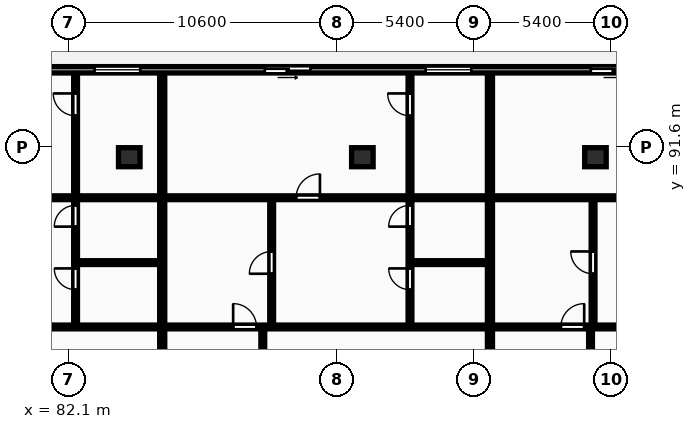
"""IFC4 building model, lengths in metres.
Left out: names, types, materials, properties, quantities, classifications, styles, units other than length and angle.
Written with IfcOpenShell. Run it as: python <this file> out.ifc"""

import sys

from ifc_helpers import new_model, si_unit, direction, frame, frame_2d, origin, origin_2d, place, context, subcontext, project, spatial, rectangle, extrude, element, fill, save


model = new_model("IFC4")
c1 = context("Model", 3, precision=1e-05, world=origin(), true_north=direction((0.0, 1.0)))
c2 = subcontext(c1, "Body", "Model", "MODEL_VIEW")
j1 = project(units=[si_unit("LENGTHUNIT", "METRE"), si_unit("PLANEANGLEUNIT", "RADIAN")], contexts=[c1])
p1 = place(None, origin())
s1 = spatial("IfcSite", under=j1, at=p1, CompositionType="ELEMENT")
p2 = place(p1, origin())
s2 = spatial("IfcBuilding", under=s1, at=p2, CompositionType="ELEMENT")
p3 = place(p2, frame((0.0, 0.0, 210.85)))
s3 = spatial("IfcBuildingStorey", under=s2, at=p3, CompositionType="ELEMENT", Elevation=210.85)
for number, where, z_axis, x_axis in (
    (1, (84.5, 91.2, 0.0), (0.0, 0.0, 1.0), (1.0, 0.0, 0.0)),
    (2, (93.7, 91.2, 0.0), (0.0, 0.0, 1.0), (1.0, 0.0, 0.0)),
    (3, (102.9, 91.2, 0.0), (0.0, 0.0, 1.0), (1.0, 0.0, 0.0)),
):
    element("IfcColumn", number, at=place(p3, frame(where, z_axis=z_axis, x_axis=x_axis)), inside=s3, PredefinedType="COLUMN", context=c2, shape_type="SweptSolid", body=[
        extrude(rectangle(XDim=0.85, YDim=0.75, at=origin_2d()), origin(), (0.0, 0.0, 1.0), 3.25),
    ])
p4 = place(p3, frame((128.4, 94.65, 0.0), z_axis=(0.0, 0.0, 1.0), x_axis=(-1.0, 0.0, 0.0)))
e4 = element("IfcWall", 4, at=p4, inside=s3, PredefinedType="STANDARD", context=c2, shape_type="SweptSolid", body=[
    extrude(rectangle(XDim=68.6, YDim=0.25, at=frame_2d((34.3, 0.0))), origin(), (0.0, 0.0, 1.0), 2.97),
])
p5 = place(p4, frame((62.6, 0.0, 0.0)))
e5 = element("IfcOpeningElement", 5, at=p5, cuts=e4, PredefinedType="OPENING", context=c2, shape_type="SweptSolid", body=[
    extrude(rectangle(XDim=1.8, YDim=2.2, at=frame_2d((0.9, 1.1))), frame((0.0, 0.135, 0.0), z_axis=(0.0, -1.0, 0.0), x_axis=(1.0, 0.0, 0.0)), (0.0, 0.0, 1.0), 0.27),
])
p6 = place(p4, frame((56.252, 0.0, 0.85)))
e6 = element("IfcOpeningElement", 6, at=p6, cuts=e4, PredefinedType="OPENING", context=c2, shape_type="SweptSolid", body=[
    extrude(rectangle(XDim=1.8, YDim=1.8, at=frame_2d((0.9, 0.9))), frame((0.0, 0.135, 0.0), z_axis=(0.0, -1.0, 0.0), x_axis=(1.0, 0.0, 0.0)), (0.0, 0.0, 1.0), 0.27),
])
p7 = place(p4, frame((49.882, 0.0, 0.0)))
e7 = element("IfcOpeningElement", 7, at=p7, cuts=e4, PredefinedType="OPENING", context=c2, shape_type="SweptSolid", body=[
    extrude(rectangle(XDim=1.8, YDim=2.2, at=frame_2d((0.9, 1.1))), frame((0.0, 0.135, 0.0), z_axis=(0.0, -1.0, 0.0), x_axis=(1.0, 0.0, 0.0)), (0.0, 0.0, 1.0), 0.27),
])
p8 = place(p4, frame((43.47, 0.0, 0.85)))
e8 = element("IfcOpeningElement", 8, at=p8, cuts=e4, PredefinedType="OPENING", context=c2, shape_type="SweptSolid", body=[
    extrude(rectangle(XDim=1.8, YDim=1.8, at=frame_2d((0.9, 0.9))), frame((0.0, 0.135, 0.0), z_axis=(0.0, -1.0, 0.0), x_axis=(1.0, 0.0, 0.0)), (0.0, 0.0, 1.0), 0.27),
])
p9 = place(p4, frame((36.75, 0.0, 0.0)))
e9 = element("IfcOpeningElement", 9, at=p9, cuts=e4, PredefinedType="OPENING", context=c2, shape_type="SweptSolid", body=[
    extrude(rectangle(XDim=1.8, YDim=2.2, at=frame_2d((0.9, 1.1))), frame((0.0, 0.135, 0.0), z_axis=(0.0, -1.0, 0.0), x_axis=(1.0, 0.0, 0.0)), (0.0, 0.0, 1.0), 0.27),
])
p10 = place(p4, frame((30.402, 0.0, 0.85)))
e10 = element("IfcOpeningElement", 10, at=p10, cuts=e4, PredefinedType="OPENING", context=c2, shape_type="SweptSolid", body=[
    extrude(rectangle(XDim=1.8, YDim=1.8, at=frame_2d((0.9, 0.9))), frame((0.0, 0.135, 0.0), z_axis=(0.0, -1.0, 0.0), x_axis=(1.0, 0.0, 0.0)), (0.0, 0.0, 1.0), 0.27),
])
p11 = place(p4, frame((23.882, 0.0, 0.0)))
e11 = element("IfcOpeningElement", 11, at=p11, cuts=e4, PredefinedType="OPENING", context=c2, shape_type="SweptSolid", body=[
    extrude(rectangle(XDim=1.8, YDim=2.2, at=frame_2d((0.9, 1.1))), frame((0.0, 0.135, 0.0), z_axis=(0.0, -1.0, 0.0), x_axis=(1.0, 0.0, 0.0)), (0.0, 0.0, 1.0), 0.27),
])
p12 = place(p4, frame((17.47, 0.0, 0.85)))
e12 = element("IfcOpeningElement", 12, at=p12, cuts=e4, PredefinedType="OPENING", context=c2, shape_type="SweptSolid", body=[
    extrude(rectangle(XDim=1.8, YDim=1.8, at=frame_2d((0.9, 0.9))), frame((0.0, 0.135, 0.0), z_axis=(0.0, -1.0, 0.0), x_axis=(1.0, 0.0, 0.0)), (0.0, 0.0, 1.0), 0.27),
])
p13 = place(p4, frame((9.415, 0.0, 0.85)))
e13 = element("IfcOpeningElement", 13, at=p13, cuts=e4, PredefinedType="OPENING", context=c2, shape_type="SweptSolid", body=[
    extrude(rectangle(XDim=1.8, YDim=1.8, at=frame_2d((0.9, 0.9))), frame((0.0, 0.135, 0.0), z_axis=(0.0, -1.0, 0.0), x_axis=(1.0, 0.0, 0.0)), (0.0, 0.0, 1.0), 0.27),
])
p14 = place(p4, frame((5.756, 0.0, 0.85)))
e14 = element("IfcOpeningElement", 14, at=p14, cuts=e4, PredefinedType="OPENING", context=c2, shape_type="SweptSolid", body=[
    extrude(rectangle(XDim=1.8, YDim=1.8, at=frame_2d((0.9, 0.9))), frame((0.0, 0.135, 0.0), z_axis=(0.0, -1.0, 0.0), x_axis=(1.0, 0.0, 0.0)), (0.0, 0.0, 1.0), 0.27),
])
p15 = place(p4, frame((13.35, 0.0, 0.0)))
e15 = element("IfcOpeningElement", 15, at=p15, cuts=e4, PredefinedType="OPENING", context=c2, shape_type="SweptSolid", body=[
    extrude(rectangle(XDim=1.8, YDim=2.2, at=frame_2d((0.9, 1.1))), frame((0.0, 0.135, 0.0), z_axis=(0.0, -1.0, 0.0), x_axis=(1.0, 0.0, 0.0)), (0.0, 0.0, 1.0), 0.27),
])
p16 = place(p4, frame((1.21, 0.0, 0.85)))
e16 = element("IfcOpeningElement", 16, at=p16, cuts=e4, PredefinedType="OPENING", context=c2, shape_type="SweptSolid", body=[
    extrude(rectangle(XDim=2.4, YDim=1.9, at=frame_2d((1.2, 0.95))), frame((0.0, 0.135, 0.0), z_axis=(0.0, -1.0, 0.0), x_axis=(1.0, 0.0, 0.0)), (0.0, 0.0, 1.0), 0.27),
])
p17 = place(p3, frame((85.8, 70.18, 0.0), z_axis=(0.0, 0.0, 1.0), x_axis=(0.0, 1.0, 0.0)))
e17 = element("IfcWall", 17, at=p17, inside=s3, PredefinedType="PARTITIONING", context=c2, shape_type="SweptSolid", body=[
    extrude(rectangle(XDim=24.32, YDim=0.2, at=frame_2d((12.16, 0.0))), origin(), (0.0, 0.0, 1.0), 2.97),
])
p18 = place(p3, frame((82.44, 87.04, 0.0), z_axis=(0.0, 0.0, 1.0), x_axis=(1.0, 0.0, 0.0)))
e18 = element("IfcWall", 18, at=p18, inside=s3, PredefinedType="PARTITIONING", context=c2, shape_type="SweptSolid", body=[
    extrude(rectangle(XDim=3.28, YDim=0.15, at=frame_2d((1.64, 0.0))), origin(), (0.0, 0.0, 1.0), 2.97),
])
p19 = place(p3, frame((82.38, 84.54, 0.0), z_axis=(0.0, 0.0, 1.0), x_axis=(0.0, 1.0, 0.0)))
e19 = element("IfcWall", 19, at=p19, inside=s3, PredefinedType="PARTITIONING", context=c2, shape_type="SweptSolid", body=[
    extrude(rectangle(XDim=9.96, YDim=0.15, at=frame_2d((4.98, 0.0))), origin(), (0.0, 0.0, 1.0), 2.97),
])
p20 = place(p19, frame((1.43, 0.0, 0.0)))
e20 = element("IfcOpeningElement", 20, at=p20, cuts=e19, PredefinedType="OPENING", context=c2, shape_type="SweptSolid", body=[
    extrude(rectangle(XDim=0.84, YDim=2.04, at=frame_2d((0.42, 1.02))), frame((0.0, 0.085, 0.0), z_axis=(0.0, -1.0, 0.0), x_axis=(1.0, 0.0, 0.0)), (0.0, 0.0, 1.0), 0.17),
])
p21 = place(p19, frame((3.92, 0.0, 0.0)))
e21 = element("IfcOpeningElement", 21, at=p21, cuts=e19, PredefinedType="OPENING", context=c2, shape_type="SweptSolid", body=[
    extrude(rectangle(XDim=0.84, YDim=2.04, at=frame_2d((0.42, 1.02))), frame((0.0, 0.085, 0.0), z_axis=(0.0, -1.0, 0.0), x_axis=(1.0, 0.0, 0.0)), (0.0, 0.0, 1.0), 0.17),
])
p22 = place(p19, frame((8.297, 0.0, 0.0)))
e22 = element("IfcOpeningElement", 22, at=p22, cuts=e19, PredefinedType="OPENING", context=c2, shape_type="SweptSolid", body=[
    extrude(rectangle(XDim=0.88, YDim=2.06, at=frame_2d((0.44, 1.03))), frame((0.0, 0.085, 0.0), z_axis=(0.0, -1.0, 0.0), x_axis=(1.0, 0.0, 0.0)), (0.0, 0.0, 1.0), 0.17),
])
p23 = place(p3, frame((72.816, 84.5, 0.0), z_axis=(0.0, 0.0, 1.0), x_axis=(1.0, 0.0, 0.0)))
e23 = element("IfcWall", 23, at=p23, inside=s3, PredefinedType="PARTITIONING", context=c2, shape_type="SweptSolid", body=[
    extrude(rectangle(XDim=12.904, YDim=0.15, at=frame_2d((6.452, 0.0))), origin(), (0.0, 0.0, 1.0), 2.97),
])
p24 = place(p23, frame((2.72, 0.0, 0.0)))
e24 = element("IfcOpeningElement", 24, at=p24, cuts=e23, PredefinedType="OPENING", context=c2, shape_type="SweptSolid", body=[
    extrude(rectangle(XDim=0.92, YDim=2.08, at=frame_2d((0.46, 1.04))), frame((0.0, 0.085, 0.0), z_axis=(0.0, -1.0, 0.0), x_axis=(1.0, 0.0, 0.0)), (0.0, 0.0, 1.0), 0.17),
])
p25 = place(p3, frame((72.816, 89.6, 0.0), z_axis=(0.0, 0.0, 1.0), x_axis=(1.0, 0.0, 0.0)))
e25 = element("IfcWall", 25, at=p25, inside=s3, PredefinedType="PARTITIONING", context=c2, shape_type="SweptSolid", body=[
    extrude(rectangle(XDim=12.904, YDim=0.15, at=frame_2d((6.452, 0.0))), origin(), (0.0, 0.0, 1.0), 2.97),
])
p26 = place(p25, frame((5.982, 0.0, 0.0)))
e26 = element("IfcOpeningElement", 26, at=p26, cuts=e25, PredefinedType="OPENING", context=c2, shape_type="SweptSolid", body=[
    extrude(rectangle(XDim=0.94, YDim=2.1, at=frame_2d((0.47, 1.05))), frame((0.0, 0.085, 0.0), z_axis=(0.0, -1.0, 0.0), x_axis=(1.0, 0.0, 0.0)), (0.0, 0.0, 1.0), 0.17),
])
p27 = place(p3, frame((98.736, 70.18, 0.0), z_axis=(0.0, 0.0, 1.0), x_axis=(0.0, 1.0, 0.0)))
e27 = element("IfcWall", 27, at=p27, inside=s3, PredefinedType="PARTITIONING", context=c2, shape_type="SweptSolid", body=[
    extrude(rectangle(XDim=24.32, YDim=0.2, at=frame_2d((12.16, 0.0))), origin(), (0.0, 0.0, 1.0), 2.97),
])
p28 = place(p3, frame((89.77, 70.16, 0.0), z_axis=(0.0, 0.0, 1.0), x_axis=(0.0, 1.0, 0.0)))
e28 = element("IfcWall", 28, at=p28, inside=s3, PredefinedType="PARTITIONING", context=c2, shape_type="SweptSolid", body=[
    extrude(rectangle(XDim=14.3, YDim=0.15, at=frame_2d((7.15, 0.0))), origin(), (0.0, 0.0, 1.0), 2.97),
])
p29 = place(p28, frame((5.84, 0.0, 0.0)))
e29 = element("IfcOpeningElement", 29, at=p29, cuts=e28, PredefinedType="OPENING", context=c2, shape_type="SweptSolid", body=[
    extrude(rectangle(XDim=0.88, YDim=2.06, at=frame_2d((0.44, 1.03))), frame((0.0, 0.085, 0.0), z_axis=(0.0, -1.0, 0.0), x_axis=(1.0, 0.0, 0.0)), (0.0, 0.0, 1.0), 0.17),
])
p30 = place(p3, frame((90.12, 84.54, 0.0), z_axis=(0.0, 0.0, 1.0), x_axis=(0.0, 1.0, 0.0)))
e30 = element("IfcWall", 30, at=p30, inside=s3, PredefinedType="PARTITIONING", context=c2, shape_type="SweptSolid", body=[
    extrude(rectangle(XDim=5.0, YDim=0.15, at=frame_2d((2.5, 0.0))), origin(), (0.0, 0.0, 1.0), 2.97),
])
p31 = place(p30, frame((2.06, 0.0, 0.0)))
e31 = element("IfcOpeningElement", 31, at=p31, cuts=e30, PredefinedType="OPENING", context=c2, shape_type="SweptSolid", body=[
    extrude(rectangle(XDim=0.88, YDim=2.06, at=frame_2d((0.44, 1.03))), frame((0.0, 0.085, 0.0), z_axis=(0.0, -1.0, 0.0), x_axis=(1.0, 0.0, 0.0)), (0.0, 0.0, 1.0), 0.17),
])
p32 = place(p3, frame((95.64, 87.04, 0.0), z_axis=(0.0, 0.0, 1.0), x_axis=(1.0, 0.0, 0.0)))
e32 = element("IfcWall", 32, at=p32, inside=s3, PredefinedType="PARTITIONING", context=c2, shape_type="SweptSolid", body=[
    extrude(rectangle(XDim=3.016, YDim=0.15, at=frame_2d((1.508, 0.0))), origin(), (0.0, 0.0, 1.0), 2.97),
])
p33 = place(p3, frame((95.58, 84.54, 0.0), z_axis=(0.0, 0.0, 1.0), x_axis=(0.0, 1.0, 0.0)))
e33 = element("IfcWall", 33, at=p33, inside=s3, PredefinedType="PARTITIONING", context=c2, shape_type="SweptSolid", body=[
    extrude(rectangle(XDim=9.96, YDim=0.15, at=frame_2d((4.98, 0.0))), origin(), (0.0, 0.0, 1.0), 2.97),
])
p34 = place(p33, frame((1.43, 0.0, 0.0)))
e34 = element("IfcOpeningElement", 34, at=p34, cuts=e33, PredefinedType="OPENING", context=c2, shape_type="SweptSolid", body=[
    extrude(rectangle(XDim=0.84, YDim=2.04, at=frame_2d((0.42, 1.02))), frame((0.0, 0.085, 0.0), z_axis=(0.0, -1.0, 0.0), x_axis=(1.0, 0.0, 0.0)), (0.0, 0.0, 1.0), 0.17),
])
p35 = place(p33, frame((3.92, 0.0, 0.0)))
e35 = element("IfcOpeningElement", 35, at=p35, cuts=e33, PredefinedType="OPENING", context=c2, shape_type="SweptSolid", body=[
    extrude(rectangle(XDim=0.84, YDim=2.04, at=frame_2d((0.42, 1.02))), frame((0.0, 0.085, 0.0), z_axis=(0.0, -1.0, 0.0), x_axis=(1.0, 0.0, 0.0)), (0.0, 0.0, 1.0), 0.17),
])
p36 = place(p33, frame((8.297, 0.0, 0.0)))
e36 = element("IfcOpeningElement", 36, at=p36, cuts=e33, PredefinedType="OPENING", context=c2, shape_type="SweptSolid", body=[
    extrude(rectangle(XDim=0.88, YDim=2.06, at=frame_2d((0.44, 1.03))), frame((0.0, 0.085, 0.0), z_axis=(0.0, -1.0, 0.0), x_axis=(1.0, 0.0, 0.0)), (0.0, 0.0, 1.0), 0.17),
])
p37 = place(p3, frame((85.88, 84.5, 0.0), z_axis=(0.0, 0.0, 1.0), x_axis=(1.0, 0.0, 0.0)))
e37 = element("IfcWall", 37, at=p37, inside=s3, PredefinedType="PARTITIONING", context=c2, shape_type="SweptSolid", body=[
    extrude(rectangle(XDim=12.776, YDim=0.15, at=frame_2d((6.388, 0.0))), origin(), (0.0, 0.0, 1.0), 2.97),
])
p38 = place(p37, frame((2.72, 0.0, 0.0)))
e38 = element("IfcOpeningElement", 38, at=p38, cuts=e37, PredefinedType="OPENING", context=c2, shape_type="SweptSolid", body=[
    extrude(rectangle(XDim=0.92, YDim=2.08, at=frame_2d((0.46, 1.04))), frame((0.0, 0.085, 0.0), z_axis=(0.0, -1.0, 0.0), x_axis=(1.0, 0.0, 0.0)), (0.0, 0.0, 1.0), 0.17),
])
p39 = place(p3, frame((85.88, 89.6, 0.0), z_axis=(0.0, 0.0, 1.0), x_axis=(1.0, 0.0, 0.0)))
e39 = element("IfcWall", 39, at=p39, inside=s3, PredefinedType="PARTITIONING", context=c2, shape_type="SweptSolid", body=[
    extrude(rectangle(XDim=12.776, YDim=0.15, at=frame_2d((6.388, 0.0))), origin(), (0.0, 0.0, 1.0), 2.97),
])
p40 = place(p39, frame((5.206, 0.0, 0.0)))
e40 = element("IfcOpeningElement", 40, at=p40, cuts=e39, PredefinedType="OPENING", context=c2, shape_type="SweptSolid", body=[
    extrude(rectangle(XDim=0.94, YDim=2.1, at=frame_2d((0.47, 1.05))), frame((0.0, 0.085, 0.0), z_axis=(0.0, -1.0, 0.0), x_axis=(1.0, 0.0, 0.0)), (0.0, 0.0, 1.0), 0.17),
])
p41 = place(p3, frame((102.706, 70.16, 0.0), z_axis=(0.0, 0.0, 1.0), x_axis=(0.0, 1.0, 0.0)))
e41 = element("IfcWall", 41, at=p41, inside=s3, PredefinedType="PARTITIONING", context=c2, shape_type="SweptSolid", body=[
    extrude(rectangle(XDim=14.3, YDim=0.15, at=frame_2d((7.15, 0.0))), origin(), (0.0, 0.0, 1.0), 2.277),
])
p42 = place(p41, frame((6.02, 0.0, 0.0)))
e42 = element("IfcOpeningElement", 42, at=p42, cuts=e41, PredefinedType="OPENING", context=c2, shape_type="SweptSolid", body=[
    extrude(rectangle(XDim=0.88, YDim=2.06, at=frame_2d((0.44, 1.03))), frame((0.0, 0.085, 0.0), z_axis=(0.0, -1.0, 0.0), x_axis=(1.0, 0.0, 0.0)), (0.0, 0.0, 1.0), 0.17),
])
p43 = place(p3, frame((102.806, 84.54, 0.0), z_axis=(0.0, 0.0, 1.0), x_axis=(0.0, 1.0, 0.0)))
e43 = element("IfcWall", 43, at=p43, inside=s3, PredefinedType="PARTITIONING", context=c2, shape_type="SweptSolid", body=[
    extrude(rectangle(XDim=5.0, YDim=0.15, at=frame_2d((2.5, 0.0))), origin(), (0.0, 0.0, 1.0), 2.277),
])
p44 = place(p43, frame((2.06, 0.0, 0.0)))
e44 = element("IfcOpeningElement", 44, at=p44, cuts=e43, PredefinedType="OPENING", context=c2, shape_type="SweptSolid", body=[
    extrude(rectangle(XDim=0.88, YDim=2.06, at=frame_2d((0.44, 1.03))), frame((0.0, 0.085, 0.0), z_axis=(0.0, -1.0, 0.0), x_axis=(1.0, 0.0, 0.0)), (0.0, 0.0, 1.0), 0.17),
])
p45 = place(p3, frame((98.816, 84.5, 0.0), z_axis=(0.0, 0.0, 1.0), x_axis=(1.0, 0.0, 0.0)))
e45 = element("IfcWall", 45, at=p45, inside=s3, PredefinedType="PARTITIONING", context=c2, shape_type="SweptSolid", body=[
    extrude(rectangle(XDim=12.904, YDim=0.15, at=frame_2d((6.452, 0.0))), origin(), (0.0, 0.0, 1.0), 2.97),
])
p46 = place(p45, frame((2.72, 0.0, 0.0)))
e46 = element("IfcOpeningElement", 46, at=p46, cuts=e45, PredefinedType="OPENING", context=c2, shape_type="SweptSolid", body=[
    extrude(rectangle(XDim=0.92, YDim=2.08, at=frame_2d((0.46, 1.04))), frame((0.0, 0.085, 0.0), z_axis=(0.0, -1.0, 0.0), x_axis=(1.0, 0.0, 0.0)), (0.0, 0.0, 1.0), 0.17),
])
p47 = place(p3, frame((98.816, 89.6, 0.0), z_axis=(0.0, 0.0, 1.0), x_axis=(1.0, 0.0, 0.0)))
e47 = element("IfcWall", 47, at=p47, inside=s3, PredefinedType="PARTITIONING", context=c2, shape_type="SweptSolid", body=[
    extrude(rectangle(XDim=12.904, YDim=0.15, at=frame_2d((6.452, 0.0))), origin(), (0.0, 0.0, 1.0), 2.97),
])
p48 = place(p47, frame((5.982, 0.0, 0.0)))
e48 = element("IfcOpeningElement", 48, at=p48, cuts=e47, PredefinedType="OPENING", context=c2, shape_type="SweptSolid", body=[
    extrude(rectangle(XDim=0.94, YDim=2.1, at=frame_2d((0.47, 1.05))), frame((0.0, 0.085, 0.0), z_axis=(0.0, -1.0, 0.0), x_axis=(1.0, 0.0, 0.0)), (0.0, 0.0, 1.0), 0.17),
])
p49 = place(p8, origin())
e49 = element("IfcWindow", 49, at=p49, inside=s3, PartitioningType="SINGLE_PANEL", PredefinedType="WINDOW", context=c2, shape_type="SweptSolid", body=[
    extrude(rectangle(XDim=1.8, YDim=1.8, at=frame_2d((0.9, 0.9))), frame((0.0, 0.03, 0.0), z_axis=(0.0, -1.0, 0.0), x_axis=(1.0, 0.0, 0.0)), (0.0, 0.0, 1.0), 0.06),
])
fill(e8, e49)
p50 = place(p9, origin())
e50 = element("IfcDoor", 50, at=p50, inside=s3, OperationType="SLIDING_TO_LEFT", PredefinedType="DOOR", context=c2, shape_type="SweptSolid", body=[
    extrude(rectangle(XDim=1.8, YDim=2.2, at=frame_2d((0.9, 1.1))), frame((0.0, 0.025, 0.0), z_axis=(0.0, -1.0, 0.0), x_axis=(1.0, 0.0, 0.0)), (0.0, 0.0, 1.0), 0.05),
])
fill(e9, e50)
p51 = place(p10, origin())
e51 = element("IfcWindow", 51, at=p51, inside=s3, PartitioningType="SINGLE_PANEL", PredefinedType="WINDOW", context=c2, shape_type="SweptSolid", body=[
    extrude(rectangle(XDim=1.8, YDim=1.8, at=frame_2d((0.9, 0.9))), frame((0.0, 0.03, 0.0), z_axis=(0.0, -1.0, 0.0), x_axis=(1.0, 0.0, 0.0)), (0.0, 0.0, 1.0), 0.06),
])
fill(e10, e51)
p52 = place(p11, origin())
e52 = element("IfcDoor", 52, at=p52, inside=s3, OperationType="SLIDING_TO_LEFT", PredefinedType="DOOR", context=c2, shape_type="SweptSolid", body=[
    extrude(rectangle(XDim=1.8, YDim=2.2, at=frame_2d((0.9, 1.1))), frame((0.0, 0.025, 0.0), z_axis=(0.0, -1.0, 0.0), x_axis=(1.0, 0.0, 0.0)), (0.0, 0.0, 1.0), 0.05),
])
fill(e11, e52)
p53 = place(p20, origin())
e53 = element("IfcDoor", 53, at=p53, inside=s3, OperationType="SINGLE_SWING_RIGHT", PredefinedType="DOOR", context=c2, shape_type="SweptSolid", body=[
    extrude(rectangle(XDim=0.84, YDim=2.04, at=frame_2d((0.42, 1.02))), frame((0.0, 0.025, 0.0), z_axis=(0.0, -1.0, 0.0), x_axis=(1.0, 0.0, 0.0)), (0.0, 0.0, 1.0), 0.05),
])
fill(e20, e53)
p54 = place(p21, origin())
e54 = element("IfcDoor", 54, at=p54, inside=s3, OperationType="SINGLE_SWING_LEFT", PredefinedType="DOOR", context=c2, shape_type="SweptSolid", body=[
    extrude(rectangle(XDim=0.84, YDim=2.04, at=frame_2d((0.42, 1.02))), frame((0.0, 0.025, 0.0), z_axis=(0.0, -1.0, 0.0), x_axis=(1.0, 0.0, 0.0)), (0.0, 0.0, 1.0), 0.05),
])
fill(e21, e54)
p55 = place(p22, origin())
e55 = element("IfcDoor", 55, at=p55, inside=s3, OperationType="SINGLE_SWING_RIGHT", PredefinedType="DOOR", context=c2, shape_type="SweptSolid", body=[
    extrude(rectangle(XDim=0.88, YDim=2.06, at=frame_2d((0.44, 1.03))), frame((0.0, 0.025, 0.0), z_axis=(0.0, -1.0, 0.0), x_axis=(1.0, 0.0, 0.0)), (0.0, 0.0, 1.0), 0.05),
])
fill(e22, e55)
p56 = place(p31, origin())
e56 = element("IfcDoor", 56, at=p56, inside=s3, OperationType="SINGLE_SWING_LEFT", PredefinedType="DOOR", context=c2, shape_type="SweptSolid", body=[
    extrude(rectangle(XDim=0.88, YDim=2.06, at=frame_2d((0.44, 1.03))), frame((0.0, 0.025, 0.0), z_axis=(0.0, -1.0, 0.0), x_axis=(1.0, 0.0, 0.0)), (0.0, 0.0, 1.0), 0.05),
])
fill(e31, e56)
p57 = place(p34, origin())
e57 = element("IfcDoor", 57, at=p57, inside=s3, OperationType="SINGLE_SWING_RIGHT", PredefinedType="DOOR", context=c2, shape_type="SweptSolid", body=[
    extrude(rectangle(XDim=0.84, YDim=2.04, at=frame_2d((0.42, 1.02))), frame((0.0, 0.025, 0.0), z_axis=(0.0, -1.0, 0.0), x_axis=(1.0, 0.0, 0.0)), (0.0, 0.0, 1.0), 0.05),
])
fill(e34, e57)
p58 = place(p35, origin())
e58 = element("IfcDoor", 58, at=p58, inside=s3, OperationType="SINGLE_SWING_LEFT", PredefinedType="DOOR", context=c2, shape_type="SweptSolid", body=[
    extrude(rectangle(XDim=0.84, YDim=2.04, at=frame_2d((0.42, 1.02))), frame((0.0, 0.025, 0.0), z_axis=(0.0, -1.0, 0.0), x_axis=(1.0, 0.0, 0.0)), (0.0, 0.0, 1.0), 0.05),
])
fill(e35, e58)
p59 = place(p36, origin())
e59 = element("IfcDoor", 59, at=p59, inside=s3, OperationType="SINGLE_SWING_RIGHT", PredefinedType="DOOR", context=c2, shape_type="SweptSolid", body=[
    extrude(rectangle(XDim=0.88, YDim=2.06, at=frame_2d((0.44, 1.03))), frame((0.0, 0.025, 0.0), z_axis=(0.0, -1.0, 0.0), x_axis=(1.0, 0.0, 0.0)), (0.0, 0.0, 1.0), 0.05),
])
fill(e36, e59)
p60 = place(p38, origin())
e60 = element("IfcDoor", 60, at=p60, inside=s3, OperationType="SINGLE_SWING_LEFT", PredefinedType="DOOR", context=c2, shape_type="SweptSolid", body=[
    extrude(rectangle(XDim=0.92, YDim=2.08, at=frame_2d((0.46, 1.04))), frame((0.0, 0.025, 0.0), z_axis=(0.0, -1.0, 0.0), x_axis=(1.0, 0.0, 0.0)), (0.0, 0.0, 1.0), 0.05),
])
fill(e38, e60)
p61 = place(p40, origin())
e61 = element("IfcDoor", 61, at=p61, inside=s3, OperationType="SINGLE_SWING_RIGHT", PredefinedType="DOOR", context=c2, shape_type="SweptSolid", body=[
    extrude(rectangle(XDim=0.94, YDim=2.1, at=frame_2d((0.47, 1.05))), frame((0.0, 0.025, 0.0), z_axis=(0.0, -1.0, 0.0), x_axis=(1.0, 0.0, 0.0)), (0.0, 0.0, 1.0), 0.05),
])
fill(e40, e61)
p62 = place(p44, origin())
e62 = element("IfcDoor", 62, at=p62, inside=s3, OperationType="SINGLE_SWING_RIGHT", PredefinedType="DOOR", context=c2, shape_type="SweptSolid", body=[
    extrude(rectangle(XDim=0.88, YDim=2.06, at=frame_2d((0.44, 1.03))), frame((0.0, 0.025, 0.0), z_axis=(0.0, -1.0, 0.0), x_axis=(1.0, 0.0, 0.0)), (0.0, 0.0, 1.0), 0.05),
])
fill(e44, e62)
p63 = place(p46, origin())
e63 = element("IfcDoor", 63, at=p63, inside=s3, OperationType="SINGLE_SWING_RIGHT", PredefinedType="DOOR", context=c2, shape_type="SweptSolid", body=[
    extrude(rectangle(XDim=0.92, YDim=2.08, at=frame_2d((0.46, 1.04))), frame((0.0, 0.025, 0.0), z_axis=(0.0, -1.0, 0.0), x_axis=(1.0, 0.0, 0.0)), (0.0, 0.0, 1.0), 0.05),
])
fill(e46, e63)
save(model, sys.argv[1])
